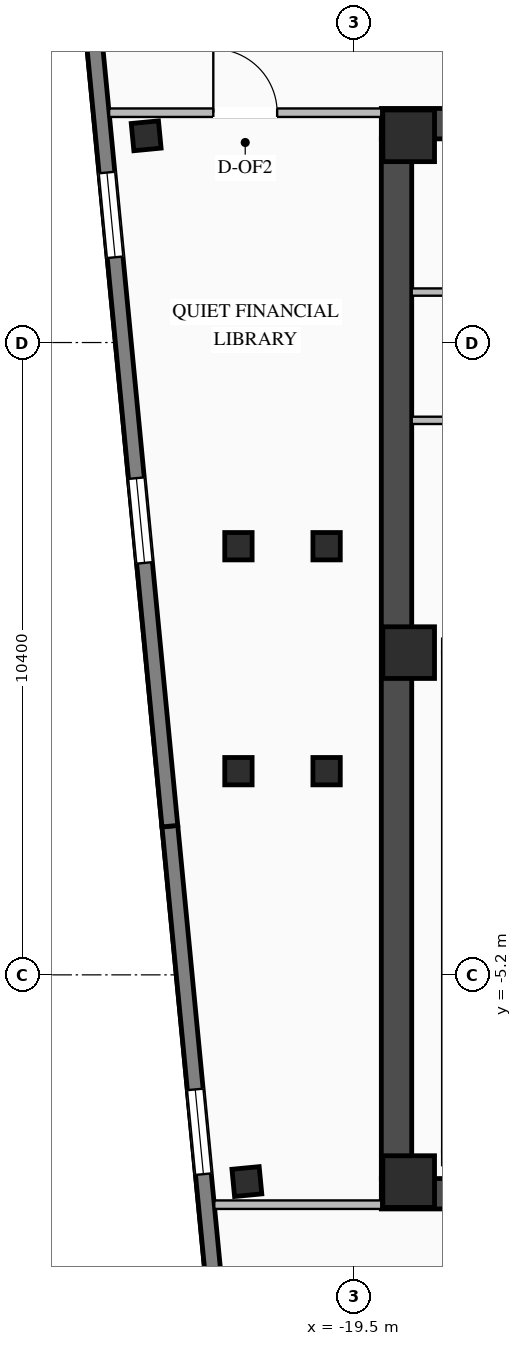
"""IFC4 building model, lengths in metres.
Left out: names, types, materials, properties, quantities, classifications, styles, units other than length and angle.
Written with IfcOpenShell. Run it as: python <this file> out.ifc"""

import sys

from ifc_helpers import new_model, si_unit, direction, frame, frame_2d, origin, origin_2d, place, context, subcontext, project, spatial, rectangle, i_section, extrude, element, fill, save


model = new_model("IFC4")
c1 = context("Model", 3, precision=1e-05, world=origin(), true_north=direction((0.0, 1.0)))
c2 = subcontext(c1, "Body", "Model", "MODEL_VIEW")
j1 = project(units=[si_unit("LENGTHUNIT", "METRE"), si_unit("PLANEANGLEUNIT", "RADIAN")], contexts=[c1])
p1 = place(None, origin())
s1 = spatial("IfcSite", under=j1, at=p1, CompositionType="ELEMENT")
p2 = place(p1, origin())
s2 = spatial("IfcBuilding", under=s1, at=p2, CompositionType="ELEMENT")
p3 = place(p2, frame((0.0, 0.0, 282.75)))
s3 = spatial("IfcBuildingStorey", under=s2, at=p3, CompositionType="ELEMENT", Elevation=282.75)
p4 = place(p3, frame((-19.05, -8.8, 0.0), z_axis=(0.0, 0.0, 1.0), x_axis=(1.0, 0.0, 0.0)))
e1 = element("IfcWall", 1, at=p4, inside=s3, PredefinedType="SHEAR", context=c2, shape_type="SweptSolid", body=[
    extrude(rectangle(XDim=10.25, YDim=0.5, at=frame_2d((5.125, 0.0))), origin(), (0.0, 0.0, 1.0), 3.95),
])
p5 = place(p3, frame((-19.05, 8.8, 0.0), z_axis=(0.0, 0.0, 1.0), x_axis=(1.0, 0.0, 0.0)))
e2 = element("IfcWall", 2, at=p5, inside=s3, PredefinedType="SHEAR", context=c2, shape_type="SweptSolid", body=[
    extrude(rectangle(XDim=10.25, YDim=0.5, at=frame_2d((5.125, 0.0))), origin(), (0.0, 0.0, 1.0), 3.95),
])
p6 = place(p5, frame((5.6, 0.0, 0.0)))
e3 = element("IfcOpeningElement", 3, at=p6, cuts=e2, PredefinedType="OPENING", context=c2, shape_type="SweptSolid", body=[
    extrude(rectangle(XDim=1.4, YDim=2.05, at=frame_2d((0.7, 1.025))), frame((0.0, 0.26, 0.0), z_axis=(0.0, -1.0, 0.0), x_axis=(1.0, 0.0, 0.0)), (0.0, 0.0, 1.0), 0.52),
])
p7 = place(p3, frame((-18.8, -8.55, 0.0), z_axis=(0.0, 0.0, 1.0), x_axis=(0.0, 1.0, 0.0)))
e4 = element("IfcWall", 4, at=p7, inside=s3, PredefinedType="SHEAR", context=c2, shape_type="SweptSolid", body=[
    extrude(rectangle(XDim=17.1, YDim=0.5, at=frame_2d((8.55, 0.0))), origin(), (0.0, 0.0, 1.0), 3.95),
])
for number, where, z_axis, x_axis in (
    (5, (-18.6, -8.6, 0.0), (0.0, 0.0, 1.0), (1.0, 0.0, 0.0)),
    (6, (-18.6, 0.1, 0.0), (0.0, 0.0, 1.0), (1.0, 0.0, 0.0)),
    (7, (-18.6, 8.6, 0.0), (0.0, 0.0, 1.0), (1.0, 0.0, 0.0)),
):
    element("IfcColumn", number, at=place(p3, frame(where, z_axis=z_axis, x_axis=x_axis)), inside=s3, PredefinedType="COLUMN", context=c2, shape_type="SweptSolid", body=[
        extrude(rectangle(XDim=0.85, YDim=0.85, at=origin_2d()), origin(), (0.0, 0.0, 1.0), 4.2),
    ])
for number, where, z_axis, x_axis in (
    (8, (-21.4, -1.85, 0.0), (0.0, 0.0, 1.0), (1.0, 0.0, 0.0)),
    (9, (-21.4, 1.85, 0.0), (0.0, 0.0, 1.0), (1.0, 0.0, 0.0)),
    (10, (-19.95, -1.85, 0.0), (0.0, 0.0, 1.0), (1.0, 0.0, 0.0)),
    (11, (-19.95, 1.85, 0.0), (0.0, 0.0, 1.0), (1.0, 0.0, 0.0)),
    (12, (-21.261, -8.6, 0.0), (0.0, 0.0, 1.0), (0.995, 0.096, 0.0)),
    (13, (-22.917, 8.6, 0.0), (0.0, 0.0, 1.0), (0.995, 0.096, 0.0)),
):
    element("IfcColumn", number, at=place(p3, frame(where, z_axis=z_axis, x_axis=x_axis)), inside=s3, PredefinedType="COLUMN", context=c2, shape_type="SweptSolid", body=[
        extrude(i_section(OverallWidth=0.45, OverallDepth=0.45, WebThickness=0.022, FlangeThickness=0.032, at=origin_2d()), origin(), (0.0, 0.0, 1.0), 4.2),
    ])
p8 = place(p3, frame((-21.075, -17.834, 0.0), z_axis=(0.0, 0.0, 1.0), x_axis=(-0.095852427869, 0.995395555582, 0.0)))
e14 = element("IfcWall", 14, at=p8, inside=s3, PredefinedType="STANDARD", context=c2, shape_type="SweptSolid", body=[
    extrude(rectangle(XDim=15.15, YDim=0.26, at=frame_2d((7.575, 0.0))), origin(), (0.0, 0.0, 1.0), 3.93),
])
p9 = place(p8, frame((4.35, 0.0, 0.76)))
e15 = element("IfcOpeningElement", 15, at=p9, cuts=e14, PredefinedType="OPENING", context=c2, shape_type="SweptSolid", body=[
    extrude(rectangle(XDim=1.4, YDim=1.95, at=frame_2d((0.7, 0.975))), frame((0.0, 0.14, 0.0), z_axis=(0.0, -1.0, 0.0), x_axis=(1.0, 0.0, 0.0)), (0.0, 0.0, 1.0), 0.28),
])
p10 = place(p8, frame((9.4, 0.0, 0.76)))
e16 = element("IfcOpeningElement", 16, at=p10, cuts=e14, PredefinedType="OPENING", context=c2, shape_type="SweptSolid", body=[
    extrude(rectangle(XDim=1.4, YDim=1.95, at=frame_2d((0.7, 0.975))), frame((0.0, 0.14, 0.0), z_axis=(0.0, -1.0, 0.0), x_axis=(1.0, 0.0, 0.0)), (0.0, 0.0, 1.0), 0.28),
])
p11 = place(p3, frame((-22.527, -2.754, 0.0), z_axis=(0.0, 0.0, 1.0), x_axis=(-0.095850890337, 0.995395703638, 0.0)))
e17 = element("IfcWall", 17, at=p11, inside=s3, PredefinedType="STANDARD", context=c2, shape_type="SweptSolid", body=[
    extrude(rectangle(XDim=15.15, YDim=0.26, at=frame_2d((7.575, 0.0))), origin(), (0.0, 0.0, 1.0), 3.93),
])
p12 = place(p11, frame((4.35, 0.0, 0.76)))
e18 = element("IfcOpeningElement", 18, at=p12, cuts=e17, PredefinedType="OPENING", context=c2, shape_type="SweptSolid", body=[
    extrude(rectangle(XDim=1.4, YDim=1.95, at=frame_2d((0.7, 0.975))), frame((0.0, 0.14, 0.0), z_axis=(0.0, -1.0, 0.0), x_axis=(1.0, 0.0, 0.0)), (0.0, 0.0, 1.0), 0.28),
])
p13 = place(p11, frame((9.4, 0.0, 0.76)))
e19 = element("IfcOpeningElement", 19, at=p13, cuts=e17, PredefinedType="OPENING", context=c2, shape_type="SweptSolid", body=[
    extrude(rectangle(XDim=1.4, YDim=1.95, at=frame_2d((0.7, 0.975))), frame((0.0, 0.14, 0.0), z_axis=(0.0, -1.0, 0.0), x_axis=(1.0, 0.0, 0.0)), (0.0, 0.0, 1.0), 0.28),
])
p14 = place(p3, frame((-18.55, 3.92, 0.0), z_axis=(0.0, 0.0, 1.0), x_axis=(1.0, 0.0, 0.0)))
e20 = element("IfcWall", 20, at=p14, inside=s3, PredefinedType="STANDARD", context=c2, shape_type="SweptSolid", body=[
    extrude(rectangle(XDim=4.65, YDim=0.12, at=frame_2d((2.325, 0.0))), origin(), (0.0, 0.0, 1.0), 3.93),
])
p15 = place(p3, frame((-18.55, 6.03, 0.0), z_axis=(0.0, 0.0, 1.0), x_axis=(1.0, 0.0, 0.0)))
e21 = element("IfcWall", 21, at=p15, inside=s3, PredefinedType="STANDARD", context=c2, shape_type="SweptSolid", body=[
    extrude(rectangle(XDim=2.4, YDim=0.12, at=frame_2d((1.2, 0.0))), origin(), (0.0, 0.0, 1.0), 3.93),
])
p16 = place(p3, frame((-23.527, 8.98, 0.0), z_axis=(0.0, 0.0, 1.0), x_axis=(1.0, 0.0, 0.0)))
e22 = element("IfcWall", 22, at=p16, inside=s3, PredefinedType="STANDARD", context=c2, shape_type="SweptSolid", body=[
    extrude(rectangle(XDim=4.477, YDim=0.14, at=frame_2d((2.238, 0.0))), origin(), (0.0, 0.0, 1.0), 3.93),
])
p17 = place(p16, frame((1.713, 0.0, 0.0)))
e23 = element("IfcOpeningElement", 23, at=p17, cuts=e22, PredefinedType="OPENING", context=c2, shape_type="SweptSolid", body=[
    extrude(rectangle(XDim=1.05, YDim=2.08, at=frame_2d((0.525, 1.04))), frame((0.0, 0.08, 0.0), z_axis=(0.0, -1.0, 0.0), x_axis=(1.0, 0.0, 0.0)), (0.0, 0.0, 1.0), 0.16),
])
p18 = place(p3, frame((-21.797, -8.98, 0.0), z_axis=(0.0, 0.0, 1.0), x_axis=(1.0, 0.0, 0.0)))
e24 = element("IfcWall", 24, at=p18, inside=s3, PredefinedType="STANDARD", context=c2, shape_type="SweptSolid", body=[
    extrude(rectangle(XDim=2.747, YDim=0.14, at=frame_2d((1.374, 0.0))), origin(), (0.0, 0.0, 1.0), 3.93),
])
p19 = place(p10, origin())
e25 = element("IfcWindow", 25, at=p19, inside=s3, PartitioningType="SINGLE_PANEL", PredefinedType="WINDOW", context=c2, shape_type="SweptSolid", body=[
    extrude(rectangle(XDim=1.4, YDim=1.95, at=frame_2d((0.7, 0.975))), frame((0.0, 0.03, 0.0), z_axis=(0.0, -1.0, 0.0), x_axis=(1.0, 0.0, 0.0)), (0.0, 0.0, 1.0), 0.06),
])
fill(e16, e25)
p20 = place(p12, origin())
e26 = element("IfcWindow", 26, at=p20, inside=s3, PartitioningType="SINGLE_PANEL", PredefinedType="WINDOW", context=c2, shape_type="SweptSolid", body=[
    extrude(rectangle(XDim=1.4, YDim=1.95, at=frame_2d((0.7, 0.975))), frame((0.0, 0.03, 0.0), z_axis=(0.0, -1.0, 0.0), x_axis=(1.0, 0.0, 0.0)), (0.0, 0.0, 1.0), 0.06),
])
fill(e18, e26)
p21 = place(p13, origin())
e27 = element("IfcWindow", 27, at=p21, inside=s3, PartitioningType="SINGLE_PANEL", PredefinedType="WINDOW", context=c2, shape_type="SweptSolid", body=[
    extrude(rectangle(XDim=1.4, YDim=1.95, at=frame_2d((0.7, 0.975))), frame((0.0, 0.03, 0.0), z_axis=(0.0, -1.0, 0.0), x_axis=(1.0, 0.0, 0.0)), (0.0, 0.0, 1.0), 0.06),
])
fill(e19, e27)
p22 = place(p17, origin())
e28 = element("IfcDoor", 28, at=p22, inside=s3, OperationType="SINGLE_SWING_LEFT", PredefinedType="DOOR", context=c2, shape_type="SweptSolid", body=[
    extrude(rectangle(XDim=1.05, YDim=2.08, at=frame_2d((0.525, 1.04))), frame((0.0, 0.025, 0.0), z_axis=(0.0, -1.0, 0.0), x_axis=(1.0, 0.0, 0.0)), (0.0, 0.0, 1.0), 0.05),
])
fill(e23, e28)
save(model, sys.argv[1])
